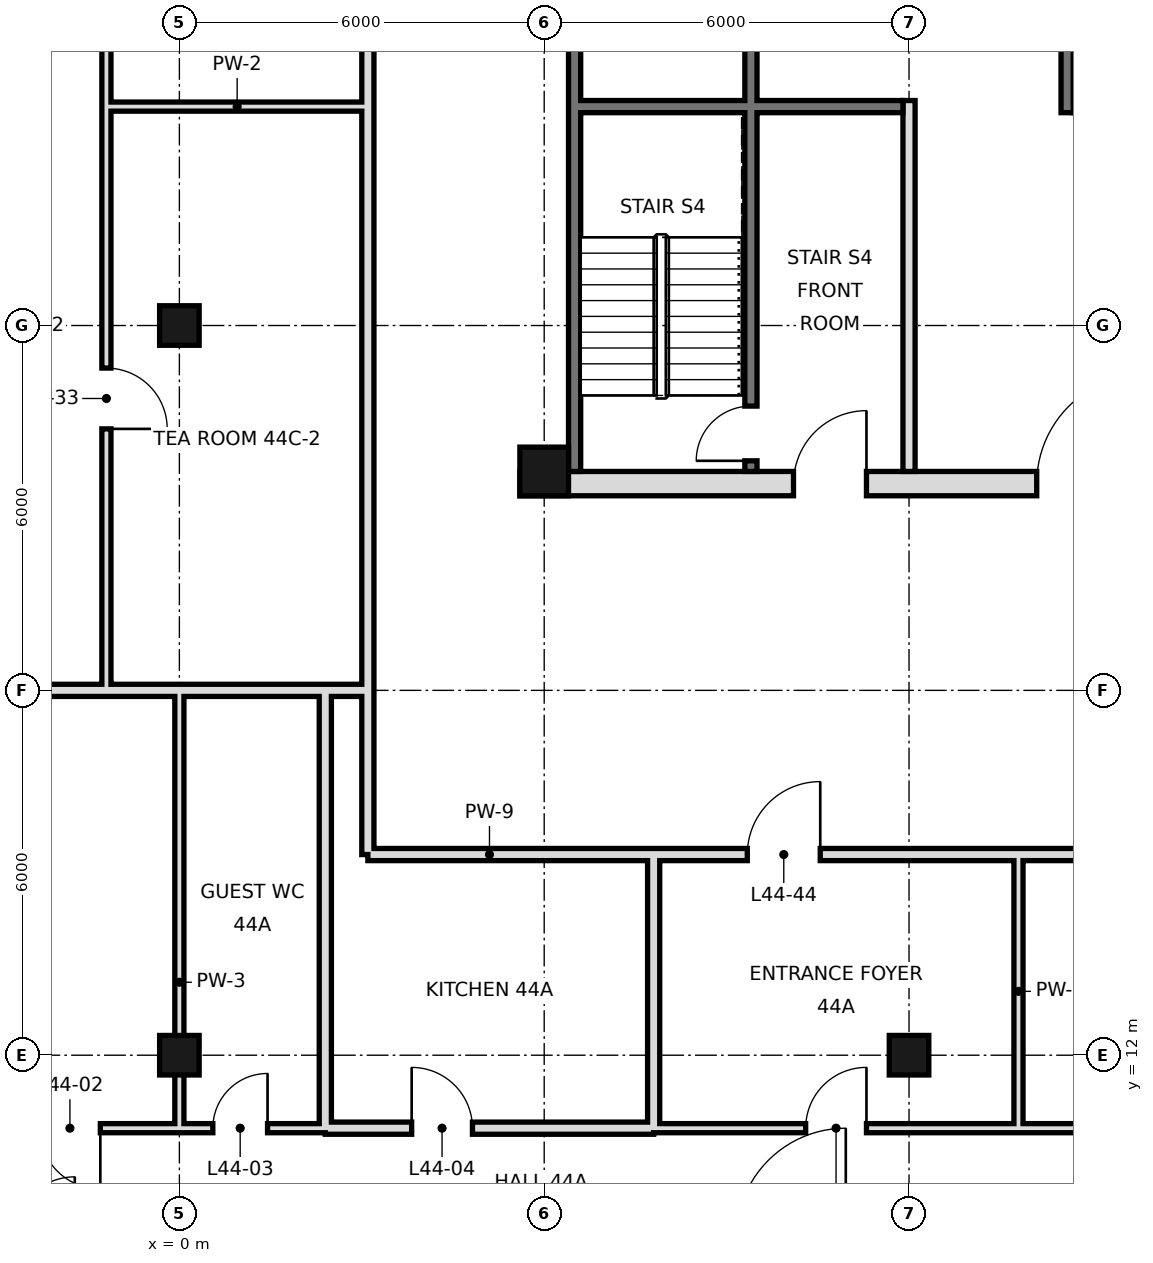
"""IFC4 building model, lengths in metres.
Left out: names, types, materials, properties, quantities, classifications, styles, units other than length and angle.
Written with IfcOpenShell. Run it as: python <this file> out.ifc"""

import sys

from ifc_helpers import new_model, si_unit, direction, frame, frame_2d, origin, origin_2d, place, context, subcontext, project, spatial, rectangle, hollow_rectangle, extrude, element, fill, save


model = new_model("IFC4")
c1 = context("Model", 3, precision=1e-05, world=origin(), true_north=direction((0.0, 1.0)))
c2 = subcontext(c1, "Body", "Model", "MODEL_VIEW")
j1 = project(units=[si_unit("LENGTHUNIT", "METRE"), si_unit("PLANEANGLEUNIT", "RADIAN")], contexts=[c1])
p1 = place(None, origin())
s1 = spatial("IfcSite", under=j1, at=p1, CompositionType="ELEMENT")
p2 = place(p1, origin())
s2 = spatial("IfcBuilding", under=s1, at=p2, CompositionType="ELEMENT")
p3 = place(p2, frame((0.0, 0.0, 192.0)))
s3 = spatial("IfcBuildingStorey", under=s2, at=p3, CompositionType="ELEMENT", Elevation=192.0)
for number, where, z_axis, x_axis in (
    (1, (0.0, 12.0, 0.0), (0.0, 0.0, 1.0), (1.0, 0.0, 0.0)),
    (2, (0.0, 24.0, 0.0), (0.0, 0.0, 1.0), (1.0, 0.0, 0.0)),
):
    element("IfcColumn", number, at=place(p3, frame(where, z_axis=z_axis, x_axis=x_axis)), inside=s3, PredefinedType="COLUMN", context=c2, shape_type="SweptSolid", body=[
        extrude(hollow_rectangle(XDim=0.65, YDim=0.65, WallThickness=0.032, at=origin_2d()), origin(), (0.0, 0.0, 1.0), 3.6),
    ])
p4 = place(p3, frame((6.0, 21.6, 0.0), z_axis=(0.0, 0.0, 1.0), x_axis=(1.0, 0.0, 0.0)))
e3 = element("IfcColumn", 3, at=p4, inside=s3, PredefinedType="COLUMN", context=c2, shape_type="SweptSolid", body=[
    extrude(hollow_rectangle(XDim=0.8, YDim=0.8, WallThickness=0.045, at=origin_2d()), origin(), (0.0, 0.0, 1.0), 3.6),
])
p5 = place(p3, frame((12.0, 12.0, 0.0), z_axis=(0.0, 0.0, 1.0), x_axis=(1.0, 0.0, 0.0)))
e4 = element("IfcColumn", 4, at=p5, inside=s3, PredefinedType="COLUMN", context=c2, shape_type="SweptSolid", body=[
    extrude(hollow_rectangle(XDim=0.65, YDim=0.65, WallThickness=0.032, at=origin_2d()), origin(), (0.0, 0.0, 1.0), 3.6),
])
p6 = place(p3, frame((-1.2, 18.0, 0.0), z_axis=(0.0, 0.0, 1.0), x_axis=(0.0, 1.0, 0.0)))
e5 = element("IfcWall", 5, at=p6, inside=s3, PredefinedType="PARTITIONING", context=c2, shape_type="SweptSolid", body=[
    extrude(rectangle(XDim=23.4, YDim=0.15, at=frame_2d((11.7, 0.0))), origin(), (0.0, 0.0, 1.0), 3.42),
])
p7 = place(p6, frame((20.5, 0.0, 0.0)))
e6 = element("IfcOpeningElement", 6, at=p7, cuts=e5, PredefinedType="OPENING", context=c2, shape_type="SweptSolid", body=[
    extrude(rectangle(XDim=1.0, YDim=2.4, at=frame_2d((0.5, 1.2))), frame((0.0, 0.085, 0.0), z_axis=(0.0, -1.0, 0.0), x_axis=(1.0, 0.0, 0.0)), (0.0, 0.0, 1.0), 0.17),
])
p8 = place(p6, frame((4.3, 0.0, 0.0)))
e7 = element("IfcOpeningElement", 7, at=p8, cuts=e5, PredefinedType="OPENING", context=c2, shape_type="SweptSolid", body=[
    extrude(rectangle(XDim=1.0, YDim=2.4, at=frame_2d((0.5, 1.2))), frame((0.0, 0.085, 0.0), z_axis=(0.0, -1.0, 0.0), x_axis=(1.0, 0.0, 0.0)), (0.0, 0.0, 1.0), 0.17),
])
p9 = place(p6, frame((15.1, 0.0, 0.0)))
e8 = element("IfcOpeningElement", 8, at=p9, cuts=e5, PredefinedType="OPENING", context=c2, shape_type="SweptSolid", body=[
    extrude(rectangle(XDim=1.0, YDim=2.4, at=frame_2d((0.5, 1.2))), frame((0.0, 0.085, 0.0), z_axis=(0.0, -1.0, 0.0), x_axis=(1.0, 0.0, 0.0)), (0.0, 0.0, 1.0), 0.17),
])
p10 = place(p3, frame((0.0, 10.8, 0.0), z_axis=(0.0, 0.0, 1.0), x_axis=(0.0, 1.0, 0.0)))
e9 = element("IfcWall", 9, at=p10, inside=s3, PredefinedType="PARTITIONING", context=c2, shape_type="SweptSolid", body=[
    extrude(rectangle(XDim=7.2, YDim=0.15, at=frame_2d((3.6, 0.0))), origin(), (0.0, 0.0, 1.0), 2.72),
])
p11 = place(p3, frame((13.8, 10.8, 0.0), z_axis=(0.0, 0.0, 1.0), x_axis=(0.0, 1.0, 0.0)))
e10 = element("IfcWall", 10, at=p11, inside=s3, PredefinedType="PARTITIONING", context=c2, shape_type="SweptSolid", body=[
    extrude(rectangle(XDim=4.5, YDim=0.15, at=frame_2d((2.25, 0.0))), origin(), (0.0, 0.0, 1.0), 3.42),
])
p12 = place(p3, frame((2.4, 10.8, 0.0), z_axis=(0.0, 0.0, 1.0), x_axis=(0.0, 1.0, 0.0)))
e11 = element("IfcWall", 11, at=p12, inside=s3, PredefinedType="SOLIDWALL", context=c2, shape_type="SweptSolid", body=[
    extrude(rectangle(XDim=7.2, YDim=0.2, at=frame_2d((3.6, 0.0))), origin(), (0.0, 0.0, 1.0), 2.72),
])
p13 = place(p3, frame((3.1, 18.0, 0.0), z_axis=(0.0, 0.0, 1.0), x_axis=(0.0, 1.0, 0.0)))
e12 = element("IfcWall", 12, at=p13, inside=s3, PredefinedType="SOLIDWALL", context=c2, shape_type="SweptSolid", body=[
    extrude(rectangle(XDim=23.4, YDim=0.2, at=frame_2d((11.7, 0.0))), origin(), (0.0, 0.0, 1.0), 2.97),
])
p14 = place(p13, frame((20.4, 0.0, 0.0)))
e13 = element("IfcOpeningElement", 13, at=p14, cuts=e12, PredefinedType="OPENING", context=c2, shape_type="SweptSolid", body=[
    extrude(rectangle(XDim=1.2, YDim=2.4, at=frame_2d((0.6, 1.2))), frame((0.0, 0.11, 0.0), z_axis=(0.0, -1.0, 0.0), x_axis=(1.0, 0.0, 0.0)), (0.0, 0.0, 1.0), 0.22),
])
p15 = place(p3, frame((3.1, 15.3, 0.0), z_axis=(0.0, 0.0, 1.0), x_axis=(0.0, 1.0, 0.0)))
e14 = element("IfcWall", 14, at=p15, inside=s3, PredefinedType="SOLIDWALL", context=c2, shape_type="SweptSolid", body=[
    extrude(rectangle(XDim=2.7, YDim=0.2, at=frame_2d((1.35, 0.0))), origin(), (0.0, 0.0, 1.0), 2.97),
])
p16 = place(p3, frame((7.8, 10.8, 0.0), z_axis=(0.0, 0.0, 1.0), x_axis=(0.0, 1.0, 0.0)))
e15 = element("IfcWall", 15, at=p16, inside=s3, PredefinedType="SOLIDWALL", context=c2, shape_type="SweptSolid", body=[
    extrude(rectangle(XDim=4.5, YDim=0.2, at=frame_2d((2.25, 0.0))), origin(), (0.0, 0.0, 1.0), 2.72),
])
p17 = place(p3, frame((2.4, 10.8, 0.0), z_axis=(0.0, 0.0, 1.0), x_axis=(1.0, 0.0, 0.0)))
e16 = element("IfcWall", 16, at=p17, inside=s3, PredefinedType="SOLIDWALL", context=c2, shape_type="SweptSolid", body=[
    extrude(rectangle(XDim=5.4, YDim=0.2, at=frame_2d((2.7, 0.0))), origin(), (0.0, 0.0, 1.0), 2.72),
])
p18 = place(p17, frame((1.42, 0.0, 0.0)))
e17 = element("IfcOpeningElement", 17, at=p18, cuts=e16, PredefinedType="OPENING", context=c2, shape_type="SweptSolid", body=[
    extrude(rectangle(XDim=1.0, YDim=2.4, at=frame_2d((0.5, 1.2))), frame((0.0, 0.11, 0.0), z_axis=(0.0, -1.0, 0.0), x_axis=(1.0, 0.0, 0.0)), (0.0, 0.0, 1.0), 0.22),
])
p19 = place(p3, frame((-12.6, 10.8, 0.0), z_axis=(0.0, 0.0, 1.0), x_axis=(1.0, 0.0, 0.0)))
e18 = element("IfcWall", 18, at=p19, inside=s3, PredefinedType="PARTITIONING", context=c2, shape_type="SweptSolid", body=[
    extrude(rectangle(XDim=12.6, YDim=0.15, at=frame_2d((6.3, 0.0))), origin(), (0.0, 0.0, 1.0), 3.42),
])
p20 = place(p19, frame((10.3, 0.0, 0.0)))
e19 = element("IfcOpeningElement", 19, at=p20, cuts=e18, PredefinedType="OPENING", context=c2, shape_type="SweptSolid", body=[
    extrude(rectangle(XDim=1.0, YDim=2.4, at=frame_2d((0.5, 1.2))), frame((0.0, 0.085, 0.0), z_axis=(0.0, -1.0, 0.0), x_axis=(1.0, 0.0, 0.0)), (0.0, 0.0, 1.0), 0.17),
])
p21 = place(p3, frame((7.8, 10.8, 0.0), z_axis=(0.0, 0.0, 1.0), x_axis=(1.0, 0.0, 0.0)))
e20 = element("IfcWall", 20, at=p21, inside=s3, PredefinedType="PARTITIONING", context=c2, shape_type="SweptSolid", body=[
    extrude(rectangle(XDim=16.2, YDim=0.15, at=frame_2d((8.1, 0.0))), origin(), (0.0, 0.0, 1.0), 3.42),
])
p22 = place(p21, frame((2.5, 0.0, 0.0)))
e21 = element("IfcOpeningElement", 21, at=p22, cuts=e20, PredefinedType="OPENING", context=c2, shape_type="SweptSolid", body=[
    extrude(rectangle(XDim=1.0, YDim=2.4, at=frame_2d((0.5, 1.2))), frame((0.0, 0.085, 0.0), z_axis=(0.0, -1.0, 0.0), x_axis=(1.0, 0.0, 0.0)), (0.0, 0.0, 1.0), 0.17),
])
p23 = place(p21, frame((8.86, 0.0, 0.0)))
e22 = element("IfcOpeningElement", 22, at=p23, cuts=e20, PredefinedType="OPENING", context=c2, shape_type="SweptSolid", body=[
    extrude(rectangle(XDim=1.0, YDim=2.4, at=frame_2d((0.5, 1.2))), frame((0.0, 0.085, 0.0), z_axis=(0.0, -1.0, 0.0), x_axis=(1.0, 0.0, 0.0)), (0.0, 0.0, 1.0), 0.17),
])
p24 = place(p3, frame((0.0, 10.8, 0.0), z_axis=(0.0, 0.0, 1.0), x_axis=(1.0, 0.0, 0.0)))
e23 = element("IfcWall", 23, at=p24, inside=s3, PredefinedType="PARTITIONING", context=c2, shape_type="SweptSolid", body=[
    extrude(rectangle(XDim=2.4, YDim=0.15, at=frame_2d((1.2, 0.0))), origin(), (0.0, 0.0, 1.0), 3.42),
])
p25 = place(p24, frame((0.55, 0.0, 0.0)))
e24 = element("IfcOpeningElement", 24, at=p25, cuts=e23, PredefinedType="OPENING", context=c2, shape_type="SweptSolid", body=[
    extrude(rectangle(XDim=0.9, YDim=2.4, at=frame_2d((0.45, 1.2))), frame((0.0, 0.085, 0.0), z_axis=(0.0, -1.0, 0.0), x_axis=(1.0, 0.0, 0.0)), (0.0, 0.0, 1.0), 0.17),
])
p26 = place(p3, frame((7.8, 15.3, 0.0), z_axis=(0.0, 0.0, 1.0), x_axis=(1.0, 0.0, 0.0)))
e25 = element("IfcWall", 25, at=p26, inside=s3, PredefinedType="SOLIDWALL", context=c2, shape_type="SweptSolid", body=[
    extrude(rectangle(XDim=28.8, YDim=0.2, at=frame_2d((14.4, 0.0))), origin(), (0.0, 0.0, 1.0), 2.72),
])
p27 = place(p26, frame((1.54, 0.0, 0.0)))
e26 = element("IfcOpeningElement", 26, at=p27, cuts=e25, PredefinedType="OPENING", context=c2, shape_type="SweptSolid", body=[
    extrude(rectangle(XDim=1.2, YDim=2.4, at=frame_2d((0.6, 1.2))), frame((0.0, 0.11, 0.0), z_axis=(0.0, -1.0, 0.0), x_axis=(1.0, 0.0, 0.0)), (0.0, 0.0, 1.0), 0.22),
])
p28 = place(p3, frame((3.1, 15.3, 0.0), z_axis=(0.0, 0.0, 1.0), x_axis=(1.0, 0.0, 0.0)))
e27 = element("IfcWall", 27, at=p28, inside=s3, PredefinedType="SOLIDWALL", context=c2, shape_type="SweptSolid", body=[
    extrude(rectangle(XDim=4.7, YDim=0.2, at=frame_2d((2.35, 0.0))), origin(), (0.0, 0.0, 1.0), 2.72),
])
p29 = place(p3, frame((2.4, 18.0, 0.0), z_axis=(0.0, 0.0, 1.0), x_axis=(1.0, 0.0, 0.0)))
e28 = element("IfcWall", 28, at=p29, inside=s3, PredefinedType="SOLIDWALL", context=c2, shape_type="SweptSolid", body=[
    extrude(rectangle(XDim=0.7, YDim=0.2, at=frame_2d((0.35, 0.0))), origin(), (0.0, 0.0, 1.0), 2.97),
])
p30 = place(p3, frame((-12.6, 18.0, 0.0), z_axis=(0.0, 0.0, 1.0), x_axis=(1.0, 0.0, 0.0)))
e29 = element("IfcWall", 29, at=p30, inside=s3, PredefinedType="SOLIDWALL", context=c2, shape_type="SweptSolid", body=[
    extrude(rectangle(XDim=15.0, YDim=0.2, at=frame_2d((7.5, 0.0))), origin(), (0.0, 0.0, 1.0), 2.72),
])
p31 = place(p3, frame((-1.2, 27.6, 0.0), z_axis=(0.0, 0.0, 1.0), x_axis=(1.0, 0.0, 0.0)))
e30 = element("IfcWall", 30, at=p31, inside=s3, PredefinedType="PARTITIONING", context=c2, shape_type="SweptSolid", body=[
    extrude(rectangle(XDim=4.3, YDim=0.15, at=frame_2d((2.15, 0.0))), origin(), (0.0, 0.0, 1.0), 3.42),
])
p32 = place(p3, frame((6.5, 21.6, 0.0), z_axis=(0.0, 0.0, 1.0), x_axis=(0.0, 1.0, 0.0)))
e31 = element("IfcWall", 31, at=p32, inside=s3, PredefinedType="SOLIDWALL", context=c2, shape_type="SweptSolid", body=[
    extrude(rectangle(XDim=23.5, YDim=0.2, at=frame_2d((11.75, 0.0))), origin(), (0.0, 0.0, 1.0), 3.42),
])
p33 = place(p3, frame((5.6, 21.4, 0.0), z_axis=(0.0, 0.0, 1.0), x_axis=(1.0, 0.0, 0.0)))
e32 = element("IfcWall", 32, at=p33, inside=s3, PredefinedType="SOLIDWALL", context=c2, shape_type="SweptSolid", body=[
    extrude(rectangle(XDim=36.8, YDim=0.4, at=frame_2d((18.4, 0.0))), origin(), (0.0, 0.0, 1.0), 3.42),
])
p34 = place(p33, frame((8.5, 0.0, 0.0)))
e33 = element("IfcOpeningElement", 33, at=p34, cuts=e32, PredefinedType="OPENING", context=c2, shape_type="SweptSolid", body=[
    extrude(rectangle(XDim=1.8, YDim=2.1, at=frame_2d((0.9, 1.05))), frame((0.0, 0.21, 0.0), z_axis=(0.0, -1.0, 0.0), x_axis=(1.0, 0.0, 0.0)), (0.0, 0.0, 1.0), 0.42),
])
p35 = place(p33, frame((17.5, 0.0, 0.0)))
e34 = element("IfcOpeningElement", 34, at=p35, cuts=e32, PredefinedType="OPENING", context=c2, shape_type="SweptSolid", body=[
    extrude(rectangle(XDim=1.8, YDim=2.1, at=frame_2d((0.9, 1.05))), frame((0.0, 0.21, 0.0), z_axis=(0.0, -1.0, 0.0), x_axis=(1.0, 0.0, 0.0)), (0.0, 0.0, 1.0), 0.42),
])
p36 = place(p33, frame((26.5, 0.0, 0.0)))
e35 = element("IfcOpeningElement", 35, at=p36, cuts=e32, PredefinedType="OPENING", context=c2, shape_type="SweptSolid", body=[
    extrude(rectangle(XDim=1.8, YDim=2.1, at=frame_2d((0.9, 1.05))), frame((0.0, 0.21, 0.0), z_axis=(0.0, -1.0, 0.0), x_axis=(1.0, 0.0, 0.0)), (0.0, 0.0, 1.0), 0.42),
])
p37 = place(p33, frame((4.5, 0.0, 0.0)))
e36 = element("IfcOpeningElement", 36, at=p37, cuts=e32, PredefinedType="OPENING", context=c2, shape_type="SweptSolid", body=[
    extrude(rectangle(XDim=1.2, YDim=2.1, at=frame_2d((0.6, 1.05))), frame((0.0, 0.21, 0.0), z_axis=(0.0, -1.0, 0.0), x_axis=(1.0, 0.0, 0.0)), (0.0, 0.0, 1.0), 0.42),
])
p38 = place(p33, frame((31.1, 0.0, 0.0)))
e37 = element("IfcOpeningElement", 37, at=p38, cuts=e32, PredefinedType="OPENING", context=c2, shape_type="SweptSolid", body=[
    extrude(rectangle(XDim=1.2, YDim=2.1, at=frame_2d((0.6, 1.05))), frame((0.0, 0.21, 0.0), z_axis=(0.0, -1.0, 0.0), x_axis=(1.0, 0.0, 0.0)), (0.0, 0.0, 1.0), 0.42),
])
p39 = place(p3, frame((12.0, 21.6, 0.0), z_axis=(0.0, 0.0, 1.0), x_axis=(0.0, 1.0, 0.0)))
e38 = element("IfcWall", 38, at=p39, inside=s3, PredefinedType="PARTITIONING", context=c2, shape_type="SweptSolid", body=[
    extrude(rectangle(XDim=6.1, YDim=0.2, at=frame_2d((3.05, 0.0))), origin(), (0.0, 0.0, 1.0), 3.42),
])
p40 = place(p3, frame((14.6, 27.5, 0.0), z_axis=(0.0, 0.0, 1.0), x_axis=(0.0, 1.0, 0.0)))
e39 = element("IfcWall", 39, at=p40, inside=s3, PredefinedType="SOLIDWALL", context=c2, shape_type="SweptSolid", body=[
    extrude(rectangle(XDim=17.5, YDim=0.2, at=frame_2d((8.75, 0.0))), origin(), (0.0, 0.0, 1.0), 3.42),
])
p41 = place(p40, frame((15.4, 0.0, 0.0)))
e40 = element("IfcOpeningElement", 40, at=p41, cuts=e39, PredefinedType="OPENING", context=c2, shape_type="SweptSolid", body=[
    extrude(rectangle(XDim=1.1, YDim=2.1, at=frame_2d((0.55, 1.05))), frame((0.0, 0.11, 0.0), z_axis=(0.0, -1.0, 0.0), x_axis=(1.0, 0.0, 0.0)), (0.0, 0.0, 1.0), 0.22),
])
p42 = place(p40, frame((2.7, 0.0, 0.0)))
e41 = element("IfcOpeningElement", 41, at=p42, cuts=e39, PredefinedType="OPENING", context=c2, shape_type="SweptSolid", body=[
    extrude(rectangle(XDim=1.0, YDim=2.1, at=frame_2d((0.5, 1.05))), frame((0.0, 0.11, 0.0), z_axis=(0.0, -1.0, 0.0), x_axis=(1.0, 0.0, 0.0)), (0.0, 0.0, 1.0), 0.22),
])
p43 = place(p40, frame((9.9, 0.0, 0.0)))
e42 = element("IfcOpeningElement", 42, at=p43, cuts=e39, PredefinedType="OPENING", context=c2, shape_type="SweptSolid", body=[
    extrude(rectangle(XDim=0.9, YDim=2.1, at=frame_2d((0.45, 1.05))), frame((0.0, 0.11, 0.0), z_axis=(0.0, -1.0, 0.0), x_axis=(1.0, 0.0, 0.0)), (0.0, 0.0, 1.0), 0.22),
])
p44 = place(p3, frame((9.4, 21.6, 0.0), z_axis=(0.0, 0.0, 1.0), x_axis=(0.0, 1.0, 0.0)))
e43 = element("IfcWall", 43, at=p44, inside=s3, PredefinedType="SOLIDWALL", context=c2, shape_type="SweptSolid", body=[
    extrude(rectangle(XDim=23.4, YDim=0.2, at=frame_2d((11.7, 0.0))), origin(), (0.0, 0.0, 1.0), 3.42),
])
p45 = place(p44, frame((7.7, 0.0, 0.0)))
e44 = element("IfcOpeningElement", 44, at=p45, cuts=e43, PredefinedType="OPENING", context=c2, shape_type="SweptSolid", body=[
    extrude(rectangle(XDim=1.0, YDim=2.1, at=frame_2d((0.5, 1.05))), frame((0.0, 0.11, 0.0), z_axis=(0.0, -1.0, 0.0), x_axis=(1.0, 0.0, 0.0)), (0.0, 0.0, 1.0), 0.22),
])
p46 = place(p44, frame((12.35, 0.0, 0.0)))
e45 = element("IfcOpeningElement", 45, at=p46, cuts=e43, PredefinedType="OPENING", context=c2, shape_type="SweptSolid", body=[
    extrude(rectangle(XDim=1.0, YDim=2.1, at=frame_2d((0.5, 1.05))), frame((0.0, 0.11, 0.0), z_axis=(0.0, -1.0, 0.0), x_axis=(1.0, 0.0, 0.0)), (0.0, 0.0, 1.0), 0.22),
])
p47 = place(p44, frame((22.1, 0.0, 0.0)))
e46 = element("IfcOpeningElement", 46, at=p47, cuts=e43, PredefinedType="OPENING", context=c2, shape_type="SweptSolid", body=[
    extrude(rectangle(XDim=1.0, YDim=2.1, at=frame_2d((0.5, 1.05))), frame((0.0, 0.11, 0.0), z_axis=(0.0, -1.0, 0.0), x_axis=(1.0, 0.0, 0.0)), (0.0, 0.0, 1.0), 0.22),
])
p48 = place(p44, frame((0.175, 0.0, 0.0)))
e47 = element("IfcOpeningElement", 47, at=p48, cuts=e43, PredefinedType="OPENING", context=c2, shape_type="SweptSolid", body=[
    extrude(rectangle(XDim=0.9, YDim=2.1, at=frame_2d((0.45, 1.05))), frame((0.0, 0.11, 0.0), z_axis=(0.0, -1.0, 0.0), x_axis=(1.0, 0.0, 0.0)), (0.0, 0.0, 1.0), 0.22),
])
p49 = place(p3, frame((6.6, 27.6, 0.0), z_axis=(0.0, 0.0, 1.0), x_axis=(1.0, 0.0, 0.0)))
e48 = element("IfcWall", 48, at=p49, inside=s3, PredefinedType="SOLIDWALL", context=c2, shape_type="SweptSolid", body=[
    extrude(rectangle(XDim=5.3, YDim=0.2, at=frame_2d((2.65, 0.0))), origin(), (0.0, 0.0, 1.0), 3.42),
])
p50 = place(p22, frame((1.0, 0.0, 0.0), z_axis=(0.0, 0.0, 1.0), x_axis=(-1.0, 0.0, 0.0)))
e49 = element("IfcDoor", 49, at=p50, inside=s3, OperationType="SINGLE_SWING_LEFT", PredefinedType="DOOR", context=c2, shape_type="SweptSolid", body=[
    extrude(rectangle(XDim=1.0, YDim=2.4, at=frame_2d((0.5, 1.2))), frame((0.0, 0.025, 0.0), z_axis=(0.0, -1.0, 0.0), x_axis=(1.0, 0.0, 0.0)), (0.0, 0.0, 1.0), 0.05),
])
fill(e21, e49)
p51 = place(p20, origin())
e50 = element("IfcDoor", 50, at=p51, inside=s3, OperationType="SINGLE_SWING_RIGHT", PredefinedType="DOOR", context=c2, shape_type="SweptSolid", body=[
    extrude(rectangle(XDim=1.0, YDim=2.4, at=frame_2d((0.5, 1.2))), frame((0.0, 0.025, 0.0), z_axis=(0.0, -1.0, 0.0), x_axis=(1.0, 0.0, 0.0)), (0.0, 0.0, 1.0), 0.05),
])
fill(e19, e50)
p52 = place(p25, frame((0.9, 0.0, 0.0), z_axis=(0.0, 0.0, 1.0), x_axis=(-1.0, 0.0, 0.0)))
e51 = element("IfcDoor", 51, at=p52, inside=s3, OperationType="SINGLE_SWING_LEFT", PredefinedType="DOOR", context=c2, shape_type="SweptSolid", body=[
    extrude(rectangle(XDim=0.9, YDim=2.4, at=frame_2d((0.45, 1.2))), frame((0.0, 0.025, 0.0), z_axis=(0.0, -1.0, 0.0), x_axis=(1.0, 0.0, 0.0)), (0.0, 0.0, 1.0), 0.05),
])
fill(e24, e51)
p53 = place(p18, origin())
e52 = element("IfcDoor", 52, at=p53, inside=s3, OperationType="SINGLE_SWING_LEFT", PredefinedType="DOOR", context=c2, shape_type="SweptSolid", body=[
    extrude(rectangle(XDim=1.0, YDim=2.4, at=frame_2d((0.5, 1.2))), frame((0.0, 0.025, 0.0), z_axis=(0.0, -1.0, 0.0), x_axis=(1.0, 0.0, 0.0)), (0.0, 0.0, 1.0), 0.05),
])
fill(e17, e52)
p54 = place(p8, frame((1.0, 0.0, 0.0), z_axis=(0.0, 0.0, 1.0), x_axis=(-1.0, 0.0, 0.0)))
e53 = element("IfcDoor", 53, at=p54, inside=s3, OperationType="SINGLE_SWING_RIGHT", PredefinedType="DOOR", context=c2, shape_type="SweptSolid", body=[
    extrude(rectangle(XDim=1.0, YDim=2.4, at=frame_2d((0.5, 1.2))), frame((0.0, 0.025, 0.0), z_axis=(0.0, -1.0, 0.0), x_axis=(1.0, 0.0, 0.0)), (0.0, 0.0, 1.0), 0.05),
])
fill(e7, e53)
p55 = place(p27, frame((1.2, 0.0, 0.0), z_axis=(0.0, 0.0, 1.0), x_axis=(-1.0, 0.0, 0.0)))
e54 = element("IfcDoor", 54, at=p55, inside=s3, OperationType="SINGLE_SWING_LEFT", PredefinedType="DOOR", context=c2, shape_type="SweptSolid", body=[
    extrude(rectangle(XDim=1.2, YDim=2.4, at=frame_2d((0.6, 1.2))), frame((0.0, 0.025, 0.0), z_axis=(0.0, -1.0, 0.0), x_axis=(1.0, 0.0, 0.0)), (0.0, 0.0, 1.0), 0.05),
])
fill(e26, e54)
p56 = place(p34, frame((1.8, 0.0, 0.0), z_axis=(0.0, 0.0, 1.0), x_axis=(-1.0, 0.0, 0.0)))
e55 = element("IfcDoor", 55, at=p56, inside=s3, OperationType="SINGLE_SWING_LEFT", PredefinedType="DOOR", context=c2, shape_type="SweptSolid", body=[
    extrude(rectangle(XDim=1.8, YDim=2.1, at=frame_2d((0.9, 1.05))), frame((0.0, 0.025, 0.0), z_axis=(0.0, -1.0, 0.0), x_axis=(1.0, 0.0, 0.0)), (0.0, 0.0, 1.0), 0.05),
])
fill(e33, e55)
p57 = place(p37, frame((1.2, 0.0, 0.0), z_axis=(0.0, 0.0, 1.0), x_axis=(-1.0, 0.0, 0.0)))
e56 = element("IfcDoor", 56, at=p57, inside=s3, OperationType="SINGLE_SWING_LEFT", PredefinedType="DOOR", context=c2, shape_type="SweptSolid", body=[
    extrude(rectangle(XDim=1.2, YDim=2.1, at=frame_2d((0.6, 1.05))), frame((0.0, 0.025, 0.0), z_axis=(0.0, -1.0, 0.0), x_axis=(1.0, 0.0, 0.0)), (0.0, 0.0, 1.0), 0.05),
])
fill(e36, e56)
p58 = place(p48, origin())
e57 = element("IfcDoor", 57, at=p58, inside=s3, OperationType="SINGLE_SWING_LEFT", PredefinedType="DOOR", context=c2, shape_type="SweptSolid", body=[
    extrude(rectangle(XDim=0.9, YDim=2.1, at=frame_2d((0.45, 1.05))), frame((0.0, 0.025, 0.0), z_axis=(0.0, -1.0, 0.0), x_axis=(1.0, 0.0, 0.0)), (0.0, 0.0, 1.0), 0.05),
])
fill(e47, e57)
save(model, sys.argv[1])
